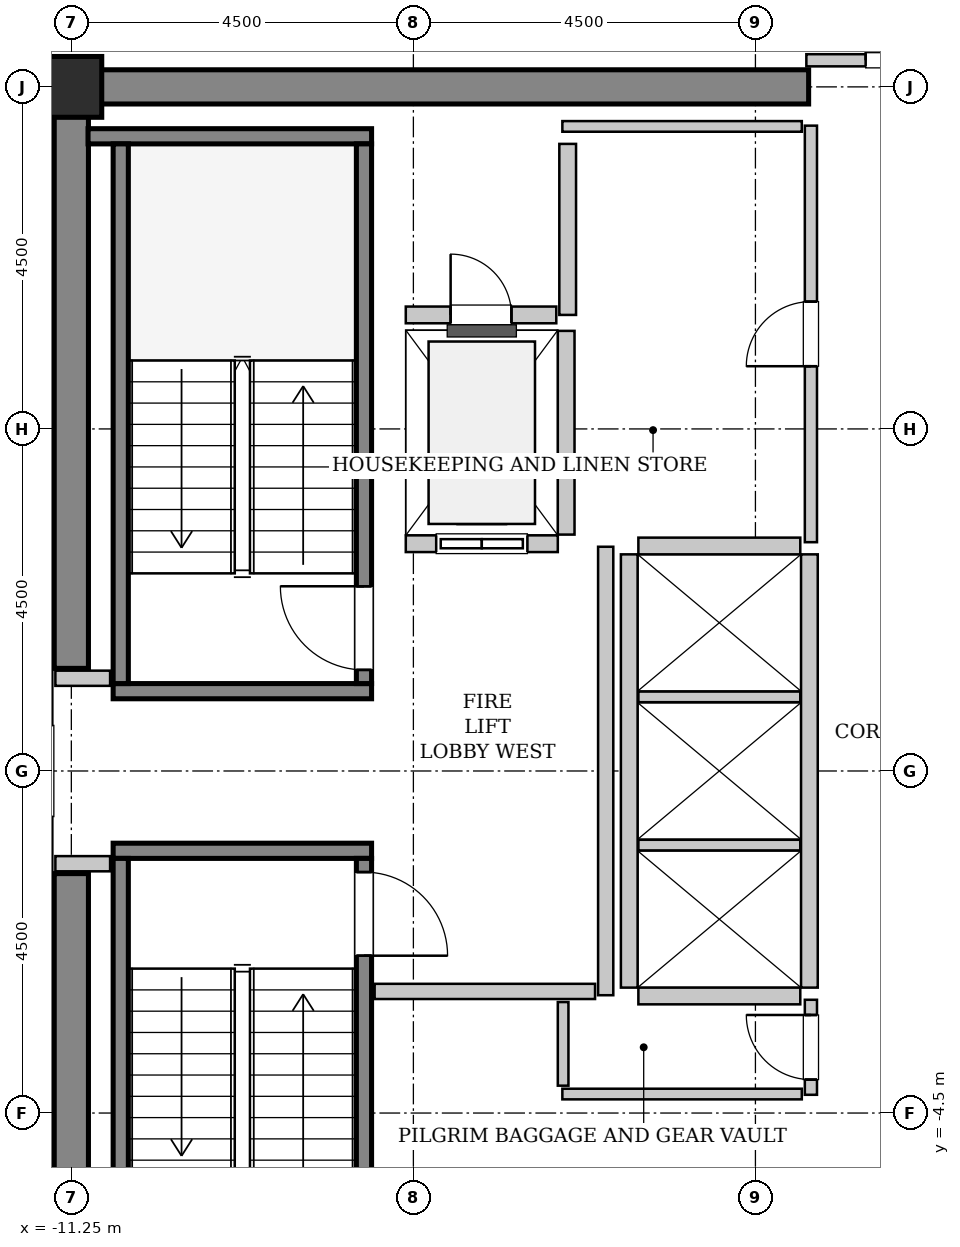
"""IFC4 building model, lengths in metres.
Left out: names, types, materials, properties, quantities, classifications, styles, units other than length and angle.
Written with IfcOpenShell. Run it as: python <this file> out.ifc"""

import sys

from ifc_helpers import new_model, si_unit, direction, frame, frame_2d, origin, origin_2d, place, context, subcontext, project, spatial, rectangle, hollow_rectangle, extrude, source, transform, mapped, element, fill, save


model = new_model("IFC4")
c1 = context("Model", 3, precision=1e-05, world=origin(), true_north=direction((0.0, 1.0)))
c2 = subcontext(c1, "Body", "Model", "MODEL_VIEW")
j1 = project(units=[si_unit("LENGTHUNIT", "METRE"), si_unit("PLANEANGLEUNIT", "RADIAN")], contexts=[c1])
p1 = place(None, origin())
s1 = spatial("IfcSite", under=j1, at=p1, CompositionType="ELEMENT")
p2 = place(p1, origin())
s2 = spatial("IfcBuilding", under=s1, at=p2, CompositionType="ELEMENT")
p3 = place(p2, frame((0.0, 0.0, 225.6)))
s3 = spatial("IfcBuildingStorey", under=s2, at=p3, CompositionType="ELEMENT", Elevation=225.6)
m1 = source(origin(), c2, "Body", "SweptSolid", [
    extrude(rectangle(XDim=9.925, YDim=0.45, at=frame_2d((4.962, 0.0))), origin(), (0.0, 0.0, 1.0), 3.8),
])
p4 = place(p3, frame((-11.475, 9.0, 0.0), z_axis=(0.0, 0.0, 1.0), x_axis=(1.0, 0.0, 0.0)))
e1 = element("IfcWall", 1, at=p4, inside=s3, PredefinedType="SHEAR", context=c2, shape_type="MappedRepresentation", body=[
    mapped(m1, transform((0.0, 0.0, 0.0), x_axis=(1.0, 0.0, 0.0), y_axis=(0.0, 1.0, 0.0), z_axis=(0.0, 0.0, 1.0), scale=1.0)),
])
m2 = source(origin(), c2, "Body", "SweptSolid", [
    extrude(rectangle(XDim=7.425, YDim=0.45, at=frame_2d((3.712, 0.0))), origin(), (0.0, 0.0, 1.0), 3.8),
])
for number, where, z_axis, x_axis in (
    (2, (-11.25, -8.775, 0.0), (0.0, 0.0, 1.0), (0.0, 1.0, 0.0)),
    (3, (-11.25, 1.35, 0.0), (0.0, 0.0, 1.0), (0.0, 1.0, 0.0)),
):
    element("IfcWall", number, at=place(p3, frame(where, z_axis=z_axis, x_axis=x_axis)), inside=s3, PredefinedType="SHEAR", context=c2, shape_type="MappedRepresentation", body=[
        mapped(m2, transform((0.0, 0.0, 0.0), x_axis=(1.0, 0.0, 0.0), y_axis=(0.0, 1.0, 0.0), z_axis=(0.0, 0.0, 1.0), scale=1.0)),
    ])
m3 = source(origin(), c2, "Body", "SweptSolid", [
    extrude(hollow_rectangle(XDim=0.8, YDim=0.8, WallThickness=0.04, InnerFilletRadius=0.04, OuterFilletRadius=0.08, at=origin_2d()), origin(), (0.0, 0.0, 1.0), 3.8),
])
p5 = place(p3, frame((-11.25, 9.0, 0.0), z_axis=(0.0, 0.0, 1.0), x_axis=(1.0, 0.0, 0.0)))
e4 = element("IfcColumn", 4, at=p5, inside=s3, PredefinedType="COLUMN", context=c2, shape_type="MappedRepresentation", body=[
    mapped(m3, transform((0.0, 0.0, 0.0), x_axis=(1.0, 0.0, 0.0), y_axis=(0.0, 1.0, 0.0), z_axis=(0.0, 0.0, 1.0), scale=1.0)),
])
m4 = source(origin(), c2, "Body", "SweptSolid", [
    extrude(rectangle(XDim=3.4, YDim=0.2, at=frame_2d((1.7, 0.0))), origin(), (0.0, 0.0, 1.0), 3.8),
])
p6 = place(p3, frame((-7.3, 1.05, 0.0), z_axis=(0.0, 0.0, 1.0), x_axis=(-1.0, 0.0, 0.0)))
e5 = element("IfcWall", 5, at=p6, inside=s3, PredefinedType="SOLIDWALL", context=c2, shape_type="MappedRepresentation", body=[
    mapped(m4, transform((0.0, 0.0, 0.0), x_axis=(1.0, 0.0, 0.0), y_axis=(0.0, 1.0, 0.0), z_axis=(0.0, 0.0, 1.0), scale=1.0)),
])
m5 = source(origin(), c2, "Body", "SweptSolid", [
    extrude(rectangle(XDim=3.73, YDim=0.2, at=frame_2d((1.865, 0.0))), origin(), (0.0, 0.0, 1.0), 3.8),
])
p7 = place(p3, frame((-7.3, 8.35, 0.0), z_axis=(0.0, 0.0, 1.0), x_axis=(-1.0, 0.0, 0.0)))
e6 = element("IfcWall", 6, at=p7, inside=s3, PredefinedType="SOLIDWALL", context=c2, shape_type="MappedRepresentation", body=[
    mapped(m5, transform((0.0, 0.0, 0.0), x_axis=(1.0, 0.0, 0.0), y_axis=(0.0, 1.0, 0.0), z_axis=(0.0, 0.0, 1.0), scale=1.0)),
])
m6 = source(origin(), c2, "Body", "SweptSolid", [
    extrude(rectangle(XDim=7.1, YDim=0.2, at=frame_2d((3.55, 0.0))), origin(), (0.0, 0.0, 1.0), 3.8),
])
p8 = place(p3, frame((-7.4, 1.15, 0.0), z_axis=(0.0, 0.0, 1.0), x_axis=(0.0, 1.0, 0.0)))
e7 = element("IfcWall", 7, at=p8, inside=s3, PredefinedType="SOLIDWALL", context=c2, shape_type="MappedRepresentation", body=[
    mapped(m6, transform((0.0, 0.0, 0.0), x_axis=(1.0, 0.0, 0.0), y_axis=(0.0, 1.0, 0.0), z_axis=(0.0, 0.0, 1.0), scale=1.0)),
])
p9 = place(p8, frame((0.18, 0.0, 0.0)))
e8 = element("IfcOpeningElement", 8, at=p9, cuts=e7, PredefinedType="OPENING", context=c2, shape_type="SweptSolid", body=[
    extrude(rectangle(XDim=1.1, YDim=2.15, at=frame_2d((0.55, 1.075))), frame((0.0, 0.11, 0.0), z_axis=(0.0, -1.0, 0.0), x_axis=(1.0, 0.0, 0.0)), (0.0, 0.0, 1.0), 0.22),
])
p10 = place(p3, frame((-10.6, 1.15, 0.0), z_axis=(0.0, 0.0, 1.0), x_axis=(0.0, 1.0, 0.0)))
e9 = element("IfcWall", 9, at=p10, inside=s3, PredefinedType="SOLIDWALL", context=c2, shape_type="MappedRepresentation", body=[
    mapped(m6, transform((0.0, 0.0, 0.0), x_axis=(1.0, 0.0, 0.0), y_axis=(0.0, 1.0, 0.0), z_axis=(0.0, 0.0, 1.0), scale=1.0)),
])
p11 = place(p3, frame((-10.7, -1.05, 0.0), z_axis=(0.0, 0.0, 1.0), x_axis=(1.0, 0.0, 0.0)))
e10 = element("IfcWall", 10, at=p11, inside=s3, PredefinedType="SOLIDWALL", context=c2, shape_type="MappedRepresentation", body=[
    mapped(m4, transform((0.0, 0.0, 0.0), x_axis=(1.0, 0.0, 0.0), y_axis=(0.0, 1.0, 0.0), z_axis=(0.0, 0.0, 1.0), scale=1.0)),
])
p12 = place(p3, frame((-10.6, -1.15, 0.0), z_axis=(0.0, 0.0, 1.0), x_axis=(0.0, -1.0, 0.0)))
e11 = element("IfcWall", 11, at=p12, inside=s3, PredefinedType="SOLIDWALL", context=c2, shape_type="MappedRepresentation", body=[
    mapped(m6, transform((0.0, 0.0, 0.0), x_axis=(1.0, 0.0, 0.0), y_axis=(0.0, 1.0, 0.0), z_axis=(0.0, 0.0, 1.0), scale=1.0)),
])
p13 = place(p3, frame((-7.4, -1.15, 0.0), z_axis=(0.0, 0.0, 1.0), x_axis=(0.0, -1.0, 0.0)))
e12 = element("IfcWall", 12, at=p13, inside=s3, PredefinedType="SOLIDWALL", context=c2, shape_type="MappedRepresentation", body=[
    mapped(m6, transform((0.0, 0.0, 0.0), x_axis=(1.0, 0.0, 0.0), y_axis=(0.0, 1.0, 0.0), z_axis=(0.0, 0.0, 1.0), scale=1.0)),
])
p14 = place(p13, frame((0.18, 0.0, 0.0)))
e13 = element("IfcOpeningElement", 13, at=p14, cuts=e12, PredefinedType="OPENING", context=c2, shape_type="SweptSolid", body=[
    extrude(rectangle(XDim=1.1, YDim=2.15, at=frame_2d((0.55, 1.075))), frame((0.0, 0.11, 0.0), z_axis=(0.0, -1.0, 0.0), x_axis=(1.0, 0.0, 0.0)), (0.0, 0.0, 1.0), 0.22),
])
m7 = source(origin(), c2, "Body", "SweptSolid", [
    extrude(rectangle(XDim=2.0, YDim=0.22, at=frame_2d((1.0, 0.0))), origin(), (0.0, 0.0, 1.0), 3.535),
])
p15 = place(p3, frame((-6.85, 2.99, 0.0), z_axis=(0.0, 0.0, 1.0), x_axis=(1.0, 0.0, 0.0)))
e14 = element("IfcWall", 14, at=p15, inside=s3, PredefinedType="SOLIDWALL", context=c2, shape_type="MappedRepresentation", body=[
    mapped(m7, transform((0.0, 0.0, 0.0), x_axis=(1.0, 0.0, 0.0), y_axis=(0.0, 1.0, 0.0), z_axis=(0.0, 0.0, 1.0), scale=1.0)),
])
p16 = place(p15, frame((0.4, 0.0, 0.0)))
e15 = element("IfcOpeningElement", 15, at=p16, cuts=e14, PredefinedType="OPENING", context=c2, shape_type="SweptSolid", body=[
    extrude(rectangle(XDim=1.2, YDim=2.2, at=frame_2d((0.6, 1.1))), frame((0.0, 0.12, 0.0), z_axis=(0.0, -1.0, 0.0), x_axis=(1.0, 0.0, 0.0)), (0.0, 0.0, 1.0), 0.24),
])
m8 = source(origin(), c2, "Body", "SweptSolid", [
    extrude(rectangle(XDim=2.68, YDim=0.22, at=frame_2d((1.34, 0.0))), origin(), (0.0, 0.0, 1.0), 3.535),
])
p17 = place(p3, frame((-4.74, 3.11, 0.0), z_axis=(0.0, 0.0, 1.0), x_axis=(0.0, 1.0, 0.0)))
e16 = element("IfcWall", 16, at=p17, inside=s3, PredefinedType="SOLIDWALL", context=c2, shape_type="MappedRepresentation", body=[
    mapped(m8, transform((0.0, 0.0, 0.0), x_axis=(1.0, 0.0, 0.0), y_axis=(0.0, 1.0, 0.0), z_axis=(0.0, 0.0, 1.0), scale=1.0)),
])
m9 = source(origin(), c2, "Body", "SweptSolid", [
    extrude(rectangle(XDim=5.7, YDim=0.22, at=frame_2d((2.85, 0.0))), origin(), (0.0, 0.0, 1.0), 3.535),
])
for number, where, z_axis, x_axis in (
    (17, (-1.54, -2.85, 0.0), (0.0, 0.0, 1.0), (0.0, 1.0, 0.0)),
    (18, (-3.91, 2.85, 0.0), (0.0, 0.0, 1.0), (0.0, -1.0, 0.0)),
):
    element("IfcWall", number, at=place(p3, frame(where, z_axis=z_axis, x_axis=x_axis)), inside=s3, PredefinedType="SOLIDWALL", context=c2, shape_type="MappedRepresentation", body=[
        mapped(m9, transform((0.0, 0.0, 0.0), x_axis=(1.0, 0.0, 0.0), y_axis=(0.0, 1.0, 0.0), z_axis=(0.0, 0.0, 1.0), scale=1.0)),
    ])
m10 = source(origin(), c2, "Body", "SweptSolid", [
    extrude(rectangle(XDim=2.13, YDim=0.22, at=frame_2d((1.065, 0.0))), origin(), (0.0, 0.0, 1.0), 3.535),
])
p18 = place(p3, frame((-3.79, -2.96, 0.0), z_axis=(0.0, 0.0, 1.0), x_axis=(1.0, 0.0, 0.0)))
e19 = element("IfcWall", 19, at=p18, inside=s3, PredefinedType="SOLIDWALL", context=c2, shape_type="MappedRepresentation", body=[
    mapped(m10, transform((0.0, 0.0, 0.0), x_axis=(1.0, 0.0, 0.0), y_axis=(0.0, 1.0, 0.0), z_axis=(0.0, 0.0, 1.0), scale=1.0)),
])
m11 = source(origin(), c2, "Body", "SweptSolid", [
    extrude(rectangle(XDim=2.13, YDim=0.14, at=frame_2d((1.065, 0.0))), origin(), (0.0, 0.0, 1.0), 3.535),
])
for number, where, z_axis, x_axis in (
    (20, (-3.79, -0.975, 0.0), (0.0, 0.0, 1.0), (1.0, 0.0, 0.0)),
    (21, (-3.79, 0.975, 0.0), (0.0, 0.0, 1.0), (1.0, 0.0, 0.0)),
):
    element("IfcWall", number, at=place(p3, frame(where, z_axis=z_axis, x_axis=x_axis)), inside=s3, PredefinedType="PARTITIONING", context=c2, shape_type="MappedRepresentation", body=[
        mapped(m11, transform((0.0, 0.0, 0.0), x_axis=(1.0, 0.0, 0.0), y_axis=(0.0, 1.0, 0.0), z_axis=(0.0, 0.0, 1.0), scale=1.0)),
    ])
p19 = place(p3, frame((-1.66, 2.96, 0.0), z_axis=(0.0, 0.0, 1.0), x_axis=(-1.0, 0.0, 0.0)))
e22 = element("IfcWall", 22, at=p19, inside=s3, PredefinedType="SOLIDWALL", context=c2, shape_type="MappedRepresentation", body=[
    mapped(m10, transform((0.0, 0.0, 0.0), x_axis=(1.0, 0.0, 0.0), y_axis=(0.0, 1.0, 0.0), z_axis=(0.0, 0.0, 1.0), scale=1.0)),
])
m12 = source(origin(), c2, "Body", "SweptSolid", [
    extrude(rectangle(XDim=2.25, YDim=0.22, at=frame_2d((1.125, 0.0))), origin(), (0.0, 0.0, 1.0), 3.535),
])
p20 = place(p3, frame((-4.72, 6.0, 0.0), z_axis=(0.0, 0.0, 1.0), x_axis=(0.0, 1.0, 0.0)))
e23 = element("IfcWall", 23, at=p20, inside=s3, PredefinedType="SOLIDWALL", context=c2, shape_type="MappedRepresentation", body=[
    mapped(m12, transform((0.0, 0.0, 0.0), x_axis=(1.0, 0.0, 0.0), y_axis=(0.0, 1.0, 0.0), z_axis=(0.0, 0.0, 1.0), scale=1.0)),
])
m13 = source(origin(), c2, "Body", "SweptSolid", [
    extrude(rectangle(XDim=1.98, YDim=0.22, at=frame_2d((0.99, 0.0))), origin(), (0.0, 0.0, 1.0), 3.535),
])
p21 = place(p3, frame((-6.85, 6.0, 0.0), z_axis=(0.0, 0.0, 1.0), x_axis=(1.0, 0.0, 0.0)))
e24 = element("IfcWall", 24, at=p21, inside=s3, PredefinedType="SOLIDWALL", context=c2, shape_type="MappedRepresentation", body=[
    mapped(m13, transform((0.0, 0.0, 0.0), x_axis=(1.0, 0.0, 0.0), y_axis=(0.0, 1.0, 0.0), z_axis=(0.0, 0.0, 1.0), scale=1.0)),
])
p22 = place(p21, frame((0.59, 0.0, 0.0)))
e25 = element("IfcOpeningElement", 25, at=p22, cuts=e24, PredefinedType="OPENING", context=c2, shape_type="SweptSolid", body=[
    extrude(rectangle(XDim=0.8, YDim=2.0, at=frame_2d((0.4, 1.0))), frame((0.0, 0.12, 0.0), z_axis=(0.0, -1.0, 0.0), x_axis=(1.0, 0.0, 0.0)), (0.0, 0.0, 1.0), 0.24),
])
m14 = source(origin(), c2, "Body", "SweptSolid", [
    extrude(rectangle(XDim=5.9, YDim=0.2, at=frame_2d((2.95, 0.0))), origin(), (0.0, 0.0, 1.0), 3.535),
])
p23 = place(p3, frame((-4.22, -2.95, 0.0), z_axis=(0.0, 0.0, 1.0), x_axis=(0.0, 1.0, 0.0)))
e26 = element("IfcWall", 26, at=p23, inside=s3, PredefinedType="PARTITIONING", context=c2, shape_type="MappedRepresentation", body=[
    mapped(m14, transform((0.0, 0.0, 0.0), x_axis=(1.0, 0.0, 0.0), y_axis=(0.0, 1.0, 0.0), z_axis=(0.0, 0.0, 1.0), scale=1.0)),
])
m15 = source(origin(), c2, "Body", "SweptSolid", [
    extrude(rectangle(XDim=2.9, YDim=0.2, at=frame_2d((1.45, 0.0))), origin(), (0.0, 0.0, 1.0), 3.535),
])
p24 = place(p3, frame((-7.26, -2.9, 0.0), z_axis=(0.0, 0.0, 1.0), x_axis=(1.0, 0.0, 0.0)))
e27 = element("IfcWall", 27, at=p24, inside=s3, PredefinedType="PARTITIONING", context=c2, shape_type="MappedRepresentation", body=[
    mapped(m15, transform((0.0, 0.0, 0.0), x_axis=(1.0, 0.0, 0.0), y_axis=(0.0, 1.0, 0.0), z_axis=(0.0, 0.0, 1.0), scale=1.0)),
])
m16 = source(origin(), c2, "Body", "SweptSolid", [
    extrude(rectangle(XDim=0.72, YDim=0.2, at=frame_2d((0.36, 0.0))), origin(), (0.0, 0.0, 1.0), 3.535),
])
for number, where, z_axis, x_axis in (
    (28, (-11.46, 1.22, 0.0), (0.0, 0.0, 1.0), (1.0, 0.0, 0.0)),
    (29, (-11.46, -1.22, 0.0), (0.0, 0.0, 1.0), (1.0, 0.0, 0.0)),
):
    element("IfcWall", number, at=place(p3, frame(where, z_axis=z_axis, x_axis=x_axis)), inside=s3, PredefinedType="PARTITIONING", context=c2, shape_type="MappedRepresentation", body=[
        mapped(m16, transform((0.0, 0.0, 0.0), x_axis=(1.0, 0.0, 0.0), y_axis=(0.0, 1.0, 0.0), z_axis=(0.0, 0.0, 1.0), scale=1.0)),
    ])
m17 = source(origin(), c2, "Body", "SweptSolid", [
    extrude(rectangle(XDim=3.16, YDim=0.16, at=frame_2d((1.58, 0.0))), origin(), (0.0, 0.0, 1.0), 2.625),
])
p25 = place(p3, frame((-1.58, 9.35, 0.0), z_axis=(0.0, 0.0, 1.0), x_axis=(1.0, 0.0, 0.0)))
e30 = element("IfcWall", 30, at=p25, inside=s3, PredefinedType="PARTITIONING", context=c2, shape_type="MappedRepresentation", body=[
    mapped(m17, transform((0.0, 0.0, 0.0), x_axis=(1.0, 0.0, 0.0), y_axis=(0.0, 1.0, 0.0), z_axis=(0.0, 0.0, 1.0), scale=1.0)),
])
p26 = place(p25, frame((0.78, 0.0, 0.0)))
e31 = element("IfcOpeningElement", 31, at=p26, cuts=e30, PredefinedType="OPENING", context=c2, shape_type="SweptSolid", body=[
    extrude(rectangle(XDim=1.6, YDim=2.3, at=frame_2d((0.8, 1.15))), frame((0.0, 0.09, 0.0), z_axis=(0.0, -1.0, 0.0), x_axis=(1.0, 0.0, 0.0)), (0.0, 0.0, 1.0), 0.18),
])
m18 = source(origin(), c2, "Body", "SweptSolid", [
    extrude(rectangle(XDim=5.48, YDim=0.16, at=frame_2d((2.74, 0.0))), origin(), (0.0, 0.0, 1.0), 3.535),
])
p27 = place(p3, frame((-1.52, 3.01, 0.0), z_axis=(0.0, 0.0, 1.0), x_axis=(0.0, 1.0, 0.0)))
e32 = element("IfcWall", 32, at=p27, inside=s3, PredefinedType="PARTITIONING", context=c2, shape_type="MappedRepresentation", body=[
    mapped(m18, transform((0.0, 0.0, 0.0), x_axis=(1.0, 0.0, 0.0), y_axis=(0.0, 1.0, 0.0), z_axis=(0.0, 0.0, 1.0), scale=1.0)),
])
p28 = place(p27, frame((2.315, 0.0, 0.0)))
e33 = element("IfcOpeningElement", 33, at=p28, cuts=e32, PredefinedType="OPENING", context=c2, shape_type="SweptSolid", body=[
    extrude(rectangle(XDim=0.85, YDim=2.1, at=frame_2d((0.425, 1.05))), frame((0.0, 0.09, 0.0), z_axis=(0.0, -1.0, 0.0), x_axis=(1.0, 0.0, 0.0)), (0.0, 0.0, 1.0), 0.18),
])
m19 = source(origin(), c2, "Body", "SweptSolid", [
    extrude(rectangle(XDim=3.15, YDim=0.14, at=frame_2d((1.575, 0.0))), origin(), (0.0, 0.0, 1.0), 3.535),
])
p29 = place(p3, frame((-4.79, 8.48, 0.0), z_axis=(0.0, 0.0, 1.0), x_axis=(1.0, 0.0, 0.0)))
e34 = element("IfcWall", 34, at=p29, inside=s3, PredefinedType="PARTITIONING", context=c2, shape_type="MappedRepresentation", body=[
    mapped(m19, transform((0.0, 0.0, 0.0), x_axis=(1.0, 0.0, 0.0), y_axis=(0.0, 1.0, 0.0), z_axis=(0.0, 0.0, 1.0), scale=1.0)),
])
m20 = source(origin(), c2, "Body", "SweptSolid", [
    extrude(rectangle(XDim=1.25, YDim=0.16, at=frame_2d((0.625, 0.0))), origin(), (0.0, 0.0, 1.0), 3.535),
])
p30 = place(p3, frame((-1.52, -4.26, 0.0), z_axis=(0.0, 0.0, 1.0), x_axis=(0.0, 1.0, 0.0)))
e35 = element("IfcWall", 35, at=p30, inside=s3, PredefinedType="PARTITIONING", context=c2, shape_type="MappedRepresentation", body=[
    mapped(m20, transform((0.0, 0.0, 0.0), x_axis=(1.0, 0.0, 0.0), y_axis=(0.0, 1.0, 0.0), z_axis=(0.0, 0.0, 1.0), scale=1.0)),
])
p31 = place(p30, frame((0.2, 0.0, 0.0)))
e36 = element("IfcOpeningElement", 36, at=p31, cuts=e35, PredefinedType="OPENING", context=c2, shape_type="SweptSolid", body=[
    extrude(rectangle(XDim=0.85, YDim=2.1, at=frame_2d((0.425, 1.05))), frame((0.0, 0.09, 0.0), z_axis=(0.0, -1.0, 0.0), x_axis=(1.0, 0.0, 0.0)), (0.0, 0.0, 1.0), 0.18),
])
p32 = place(p3, frame((-4.79, -4.25, 0.0), z_axis=(0.0, 0.0, 1.0), x_axis=(1.0, 0.0, 0.0)))
e37 = element("IfcWall", 37, at=p32, inside=s3, PredefinedType="PARTITIONING", context=c2, shape_type="MappedRepresentation", body=[
    mapped(m19, transform((0.0, 0.0, 0.0), x_axis=(1.0, 0.0, 0.0), y_axis=(0.0, 1.0, 0.0), z_axis=(0.0, 0.0, 1.0), scale=1.0)),
])
m21 = source(origin(), c2, "Body", "SweptSolid", [
    extrude(rectangle(XDim=1.1, YDim=0.14, at=frame_2d((0.55, 0.0))), origin(), (0.0, 0.0, 1.0), 3.535),
])
p33 = place(p3, frame((-4.78, -4.14, 0.0), z_axis=(0.0, 0.0, 1.0), x_axis=(0.0, 1.0, 0.0)))
e38 = element("IfcWall", 38, at=p33, inside=s3, PredefinedType="PARTITIONING", context=c2, shape_type="MappedRepresentation", body=[
    mapped(m21, transform((0.0, 0.0, 0.0), x_axis=(1.0, 0.0, 0.0), y_axis=(0.0, 1.0, 0.0), z_axis=(0.0, 0.0, 1.0), scale=1.0)),
])
m22 = source(origin(), c2, "Body", "SweptSolid", [
    extrude(rectangle(XDim=1.1, YDim=2.15, at=frame_2d((0.55, 1.075))), frame((0.0, 0.025, 0.0), z_axis=(0.0, -1.0, 0.0), x_axis=(1.0, 0.0, 0.0)), (0.0, 0.0, 1.0), 0.05),
])
p34 = place(p9, origin())
e39 = element("IfcDoor", 39, at=p34, inside=s3, OperationType="SINGLE_SWING_RIGHT", PredefinedType="DOOR", context=c2, shape_type="MappedRepresentation", body=[
    mapped(m22, transform((0.0, 0.0, 0.0), x_axis=(1.0, 0.0, 0.0), y_axis=(0.0, 1.0, 0.0), z_axis=(0.0, 0.0, 1.0), scale=1.0)),
])
fill(e8, e39)
p35 = place(p14, origin())
e40 = element("IfcDoor", 40, at=p35, inside=s3, OperationType="SINGLE_SWING_RIGHT", PredefinedType="DOOR", context=c2, shape_type="MappedRepresentation", body=[
    mapped(m22, transform((0.0, 0.0, 0.0), x_axis=(1.0, 0.0, 0.0), y_axis=(0.0, 1.0, 0.0), z_axis=(0.0, 0.0, 1.0), scale=1.0)),
])
fill(e13, e40)
m23 = source(origin(), c2, "Body", "SweptSolid", [
    extrude(rectangle(XDim=1.2, YDim=2.2, at=frame_2d((0.6, 1.1))), frame((0.0, 0.025, 0.0), z_axis=(0.0, -1.0, 0.0), x_axis=(1.0, 0.0, 0.0)), (0.0, 0.0, 1.0), 0.05),
])
p36 = place(p16, origin())
e41 = element("IfcDoor", 41, at=p36, inside=s3, OperationType="SLIDING_TO_LEFT", PredefinedType="DOOR", context=c2, shape_type="MappedRepresentation", body=[
    mapped(m23, transform((0.0, 0.0, 0.0), x_axis=(1.0, 0.0, 0.0), y_axis=(0.0, 1.0, 0.0), z_axis=(0.0, 0.0, 1.0), scale=1.0)),
])
fill(e15, e41)
m24 = source(origin(), c2, "Body", "SweptSolid", [
    extrude(rectangle(XDim=0.8, YDim=2.0, at=frame_2d((0.4, 1.0))), frame((0.0, 0.025, 0.0), z_axis=(0.0, -1.0, 0.0), x_axis=(1.0, 0.0, 0.0)), (0.0, 0.0, 1.0), 0.05),
])
p37 = place(p22, origin())
e42 = element("IfcDoor", 42, at=p37, inside=s3, OperationType="SINGLE_SWING_LEFT", PredefinedType="TRAPDOOR", context=c2, shape_type="MappedRepresentation", body=[
    mapped(m24, transform((0.0, 0.0, 0.0), x_axis=(1.0, 0.0, 0.0), y_axis=(0.0, 1.0, 0.0), z_axis=(0.0, 0.0, 1.0), scale=1.0)),
])
fill(e25, e42)
m25 = source(origin(), c2, "Body", "SweptSolid", [
    extrude(rectangle(XDim=1.6, YDim=2.3, at=frame_2d((0.8, 1.15))), frame((0.0, 0.025, 0.0), z_axis=(0.0, -1.0, 0.0), x_axis=(1.0, 0.0, 0.0)), (0.0, 0.0, 1.0), 0.05),
])
p38 = place(p26, origin())
e43 = element("IfcDoor", 43, at=p38, inside=s3, OperationType="DOUBLE_DOOR_SINGLE_SWING", PredefinedType="DOOR", context=c2, shape_type="MappedRepresentation", body=[
    mapped(m25, transform((0.0, 0.0, 0.0), x_axis=(1.0, 0.0, 0.0), y_axis=(0.0, 1.0, 0.0), z_axis=(0.0, 0.0, 1.0), scale=1.0)),
])
fill(e31, e43)
m26 = source(origin(), c2, "Body", "SweptSolid", [
    extrude(rectangle(XDim=0.85, YDim=2.1, at=frame_2d((0.425, 1.05))), frame((0.0, 0.025, 0.0), z_axis=(0.0, -1.0, 0.0), x_axis=(1.0, 0.0, 0.0)), (0.0, 0.0, 1.0), 0.05),
])
p39 = place(p28, origin())
e44 = element("IfcDoor", 44, at=p39, inside=s3, OperationType="SINGLE_SWING_LEFT", PredefinedType="DOOR", context=c2, shape_type="MappedRepresentation", body=[
    mapped(m26, transform((0.0, 0.0, 0.0), x_axis=(1.0, 0.0, 0.0), y_axis=(0.0, 1.0, 0.0), z_axis=(0.0, 0.0, 1.0), scale=1.0)),
])
fill(e33, e44)
p40 = place(p31, origin())
e45 = element("IfcDoor", 45, at=p40, inside=s3, OperationType="SINGLE_SWING_RIGHT", PredefinedType="DOOR", context=c2, shape_type="MappedRepresentation", body=[
    mapped(m26, transform((0.0, 0.0, 0.0), x_axis=(1.0, 0.0, 0.0), y_axis=(0.0, 1.0, 0.0), z_axis=(0.0, 0.0, 1.0), scale=1.0)),
])
fill(e36, e45)
save(model, sys.argv[1])
